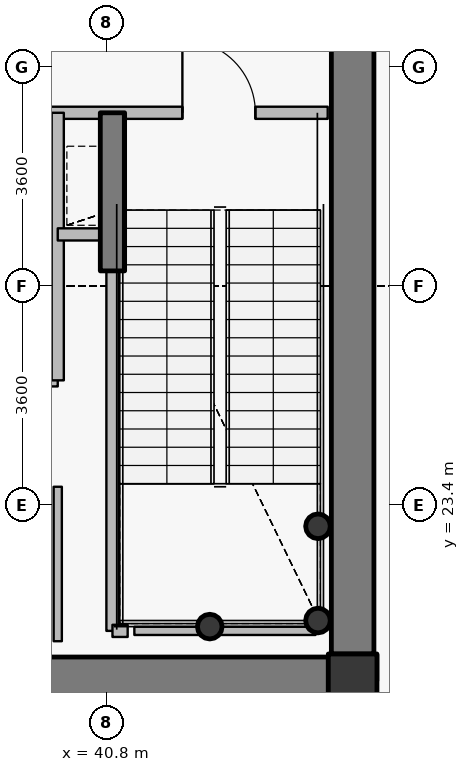
"""IFC4 building model, lengths in metres.
Left out: names, types, materials, properties, quantities, classifications, styles, units other than length and angle.
Written with IfcOpenShell. Run it as: python <this file> out.ifc"""

import sys

from ifc_helpers import new_model, si_unit, direction, frame, frame_2d, origin, origin_2d, place, context, subcontext, project, spatial, rectangle, hollow_circle, extrude, source, transform, mapped, element, fill, save


model = new_model("IFC4")
c1 = context("Model", 3, precision=1e-05, world=origin(), true_north=direction((0.0, 1.0)))
c2 = subcontext(c1, "Body", "Model", "MODEL_VIEW")
j1 = project(units=[si_unit("LENGTHUNIT", "METRE"), si_unit("PLANEANGLEUNIT", "RADIAN")], contexts=[c1])
p1 = place(None, origin())
s1 = spatial("IfcSite", under=j1, at=p1, CompositionType="ELEMENT")
p2 = place(p1, origin())
s2 = spatial("IfcBuilding", under=s1, at=p2, CompositionType="ELEMENT")
p3 = place(p2, frame((0.0, 0.0, 363.6)))
s3 = spatial("IfcBuildingStorey", under=s2, at=p3, CompositionType="ELEMENT", Elevation=363.6)
p4 = place(p3, frame((44.85, 20.55, 0.0), z_axis=(0.0, 0.0, 1.0), x_axis=(1.0, 0.0, 0.0)))
e1 = element("IfcColumn", 1, at=p4, inside=s3, PredefinedType="COLUMN", context=c2, shape_type="SweptSolid", body=[
    extrude(rectangle(XDim=0.8, YDim=0.8, at=origin_2d()), origin(), (0.0, 0.0, 1.0), 4.8),
])
for number, where, z_axis, x_axis in (
    (2, (44.28, 21.5, 0.0), (0.0, 0.0, 1.0), (1.0, 0.0, 0.0)),
    (3, (44.28, 23.05, 0.0), (0.0, 0.0, 1.0), (1.0, 0.0, 0.0)),
    (4, (42.5, 21.4, 0.0), (0.0, 0.0, 1.0), (1.0, 0.0, 0.0)),
):
    element("IfcColumn", number, at=place(p3, frame(where, z_axis=z_axis, x_axis=x_axis)), inside=s3, PredefinedType="COLUMN", context=c2, shape_type="SweptSolid", body=[
        extrude(hollow_circle(Radius=0.203, WallThickness=0.016, at=origin_2d()), origin(), (0.0, 0.0, 1.0), 4.8),
    ])
p5 = place(p3, frame((44.85, 33.05, 0.0), z_axis=(0.0, 0.0, 1.0), x_axis=(0.0, -1.0, 0.0)))
e5 = element("IfcWall", 5, at=p5, inside=s3, PredefinedType="SHEAR", context=c2, shape_type="SweptSolid", body=[
    extrude(rectangle(XDim=12.1, YDim=0.7, at=frame_2d((6.05, 0.0))), origin(), (0.0, 0.0, 1.0), 4.05),
])
p6 = place(p3, frame((44.45, 20.55, 0.0), z_axis=(0.0, 0.0, 1.0), x_axis=(-1.0, 0.0, 0.0)))
e6 = element("IfcWall", 6, at=p6, inside=s3, PredefinedType="SHEAR", context=c2, shape_type="SweptSolid", body=[
    extrude(rectangle(XDim=16.9, YDim=0.7, at=frame_2d((8.45, 0.0))), origin(), (0.0, 0.0, 1.0), 4.05),
])
p7 = place(p6, frame((13.075, 0.0, 0.0)))
e7 = element("IfcOpeningElement", 7, at=p7, cuts=e6, PredefinedType="OPENING", context=c2, shape_type="SweptSolid", body=[
    extrude(rectangle(XDim=1.15, YDim=2.15, at=origin_2d()), frame((0.575, 0.36, 1.075), z_axis=(0.0, -1.0, 0.0), x_axis=(1.0, 0.0, 0.0)), (0.0, 0.0, 1.0), 0.72),
])
p8 = place(p6, frame((9.2, 0.0, 0.0)))
e8 = element("IfcOpeningElement", 8, at=p8, cuts=e6, PredefinedType="OPENING", context=c2, shape_type="SweptSolid", body=[
    extrude(rectangle(XDim=1.15, YDim=2.15, at=origin_2d()), frame((0.575, 0.36, 1.075), z_axis=(0.0, -1.0, 0.0), x_axis=(1.0, 0.0, 0.0)), (0.0, 0.0, 1.0), 0.72),
])
p9 = place(p3, frame((40.9, 27.25, 0.0), z_axis=(0.0, 0.0, 1.0), x_axis=(0.0, 1.0, 0.0)))
e9 = element("IfcWall", 9, at=p9, inside=s3, PredefinedType="SHEAR", context=c2, shape_type="SweptSolid", body=[
    extrude(rectangle(XDim=2.6, YDim=0.4, at=frame_2d((1.3, 0.0))), origin(), (0.0, 0.0, 1.0), 4.1),
])
p10 = place(p3, frame((35.05, 27.25, 0.0), z_axis=(0.0, 0.0, 1.0), x_axis=(1.0, 0.0, 0.0)))
e10 = element("IfcWall", 10, at=p10, inside=s3, PredefinedType="PARTITIONING", context=c2, shape_type="SweptSolid", body=[
    extrude(rectangle(XDim=4.95, YDim=0.2, at=frame_2d((2.475, 0.0))), origin(), (0.0, 0.0, 1.0), 4.085),
])
p11 = place(p3, frame((35.45, 25.45, 0.0), z_axis=(0.0, 0.0, 1.0), x_axis=(1.0, 0.0, 0.0)))
e11 = element("IfcWall", 11, at=p11, inside=s3, PredefinedType="PARTITIONING", context=c2, shape_type="SweptSolid", body=[
    extrude(rectangle(XDim=4.55, YDim=0.2, at=frame_2d((2.275, 0.0))), origin(), (0.0, 0.0, 1.0), 4.085),
])
p12 = place(p3, frame((35.95, 29.85, 0.0), z_axis=(0.0, 0.0, 1.0), x_axis=(1.0, 0.0, 0.0)))
e12 = element("IfcWall", 12, at=p12, inside=s3, PredefinedType="PARTITIONING", context=c2, shape_type="SweptSolid", body=[
    extrude(rectangle(XDim=8.49, YDim=0.2, at=frame_2d((4.245, 0.0))), origin(), (0.0, 0.0, 1.0), 4.085),
])
p13 = place(p12, frame((6.1, 0.0, 0.0)))
e13 = element("IfcOpeningElement", 13, at=p13, cuts=e12, PredefinedType="OPENING", context=c2, shape_type="SweptSolid", body=[
    extrude(rectangle(XDim=1.2, YDim=2.15, at=origin_2d()), frame((0.6, 0.11, 1.075), z_axis=(0.0, -1.0, 0.0), x_axis=(1.0, 0.0, 0.0)), (0.0, 0.0, 1.0), 0.22),
])
p14 = place(p12, frame((0.37, 0.0, 0.0)))
e14 = element("IfcOpeningElement", 14, at=p14, cuts=e12, PredefinedType="OPENING", context=c2, shape_type="SweptSolid", body=[
    extrude(rectangle(XDim=1.15, YDim=2.15, at=origin_2d()), frame((0.575, 0.11, 1.075), z_axis=(0.0, -1.0, 0.0), x_axis=(1.0, 0.0, 0.0)), (0.0, 0.0, 1.0), 0.22),
])
p15 = place(p12, frame((2.425, 0.0, 0.0)))
e15 = element("IfcOpeningElement", 15, at=p15, cuts=e12, PredefinedType="OPENING", context=c2, shape_type="SweptSolid", body=[
    extrude(rectangle(XDim=1.05, YDim=2.15, at=origin_2d()), frame((0.525, 0.11, 1.075), z_axis=(0.0, -1.0, 0.0), x_axis=(1.0, 0.0, 0.0)), (0.0, 0.0, 1.0), 0.22),
])
p16 = place(p3, frame((40.0, 25.45, 0.0), z_axis=(0.0, 0.0, 1.0), x_axis=(0.0, 1.0, 0.0)))
e16 = element("IfcWall", 16, at=p16, inside=s3, PredefinedType="PARTITIONING", context=c2, shape_type="SweptSolid", body=[
    extrude(rectangle(XDim=4.4, YDim=0.2, at=frame_2d((2.2, 0.0))), origin(), (0.0, 0.0, 1.0), 4.5),
])
p17 = place(p3, frame((40.0, 27.85, 0.0), z_axis=(0.0, 0.0, 1.0), x_axis=(1.0, 0.0, 0.0)))
e17 = element("IfcWall", 17, at=p17, inside=s3, PredefinedType="PARTITIONING", context=c2, shape_type="SweptSolid", body=[
    extrude(rectangle(XDim=0.9, YDim=0.2, at=frame_2d((0.45, 0.0))), origin(), (0.0, 0.0, 1.0), 4.5),
])
p18 = place(p3, frame((40.9, 21.33, 0.0), z_axis=(0.0, 0.0, 1.0), x_axis=(0.0, 1.0, 0.0)))
e18 = element("IfcWall", 18, at=p18, inside=s3, PredefinedType="PARTITIONING", context=c2, shape_type="SweptSolid", body=[
    extrude(rectangle(XDim=5.91, YDim=0.2, at=frame_2d((2.955, 0.0))), origin(), (0.0, 0.0, 1.0), 4.035),
])
p19 = place(p3, frame((40.9, 21.33, 0.0), z_axis=(0.0, 0.0, 1.0), x_axis=(1.0, 0.0, 0.0)))
e19 = element("IfcWall", 19, at=p19, inside=s3, PredefinedType="PARTITIONING", context=c2, shape_type="SweptSolid", body=[
    extrude(rectangle(XDim=0.25, YDim=0.2, at=frame_2d((0.125, 0.0))), origin(), (0.0, 0.0, 1.0), 4.035),
])
p20 = place(p3, frame((44.24, 21.33, 0.0), z_axis=(0.0, 0.0, 1.0), x_axis=(-1.0, 0.0, 0.0)))
e20 = element("IfcWall", 20, at=p20, inside=s3, PredefinedType="PARTITIONING", context=c2, shape_type="SweptSolid", body=[
    extrude(rectangle(XDim=2.98, YDim=0.135, at=frame_2d((1.49, 0.0))), origin(), (0.0, 0.0, 1.0), 4.035),
])
p21 = place(p3, frame((40.0, 23.7, 0.0), z_axis=(0.0, 0.0, 1.0), x_axis=(0.0, -1.0, 0.0)))
e21 = element("IfcWall", 21, at=p21, inside=s3, PredefinedType="PARTITIONING", context=c2, shape_type="SweptSolid", body=[
    extrude(rectangle(XDim=2.54, YDim=0.135, at=frame_2d((1.27, 0.0))), origin(), (0.0, 0.0, 1.0), 4.035),
])
p22 = place(p3, frame((45.2, 20.508, 0.0), z_axis=(0.0, 0.0, 1.0), x_axis=(0.0, 1.0, 0.0)))
e22 = element("IfcWall", 22, at=p22, inside=s3, PredefinedType="PARTITIONING", context=c2, shape_type="SweptSolid", body=[
    extrude(rectangle(XDim=0.432, YDim=0.135, at=frame_2d((0.216, 0.0))), origin(), (0.0, 0.0, 1.0), 4.5),
])
m1 = source(origin(), c2, "Body", "SweptSolid", [
    extrude(rectangle(XDim=1.2, YDim=2.15, at=origin_2d()), frame((0.6, 0.025, 1.075), z_axis=(0.0, -1.0, 0.0), x_axis=(1.0, 0.0, 0.0)), (0.0, 0.0, 1.0), 0.05),
])
p23 = place(p13, origin())
e23 = element("IfcDoor", 23, at=p23, inside=s3, OperationType="SINGLE_SWING_LEFT", PredefinedType="DOOR", context=c2, shape_type="MappedRepresentation", body=[
    mapped(m1, transform((0.0, 0.0, 0.0), x_axis=(1.0, 0.0, 0.0), y_axis=(0.0, 1.0, 0.0), z_axis=(0.0, 0.0, 1.0), scale=1.0)),
])
fill(e13, e23)
save(model, sys.argv[1])
